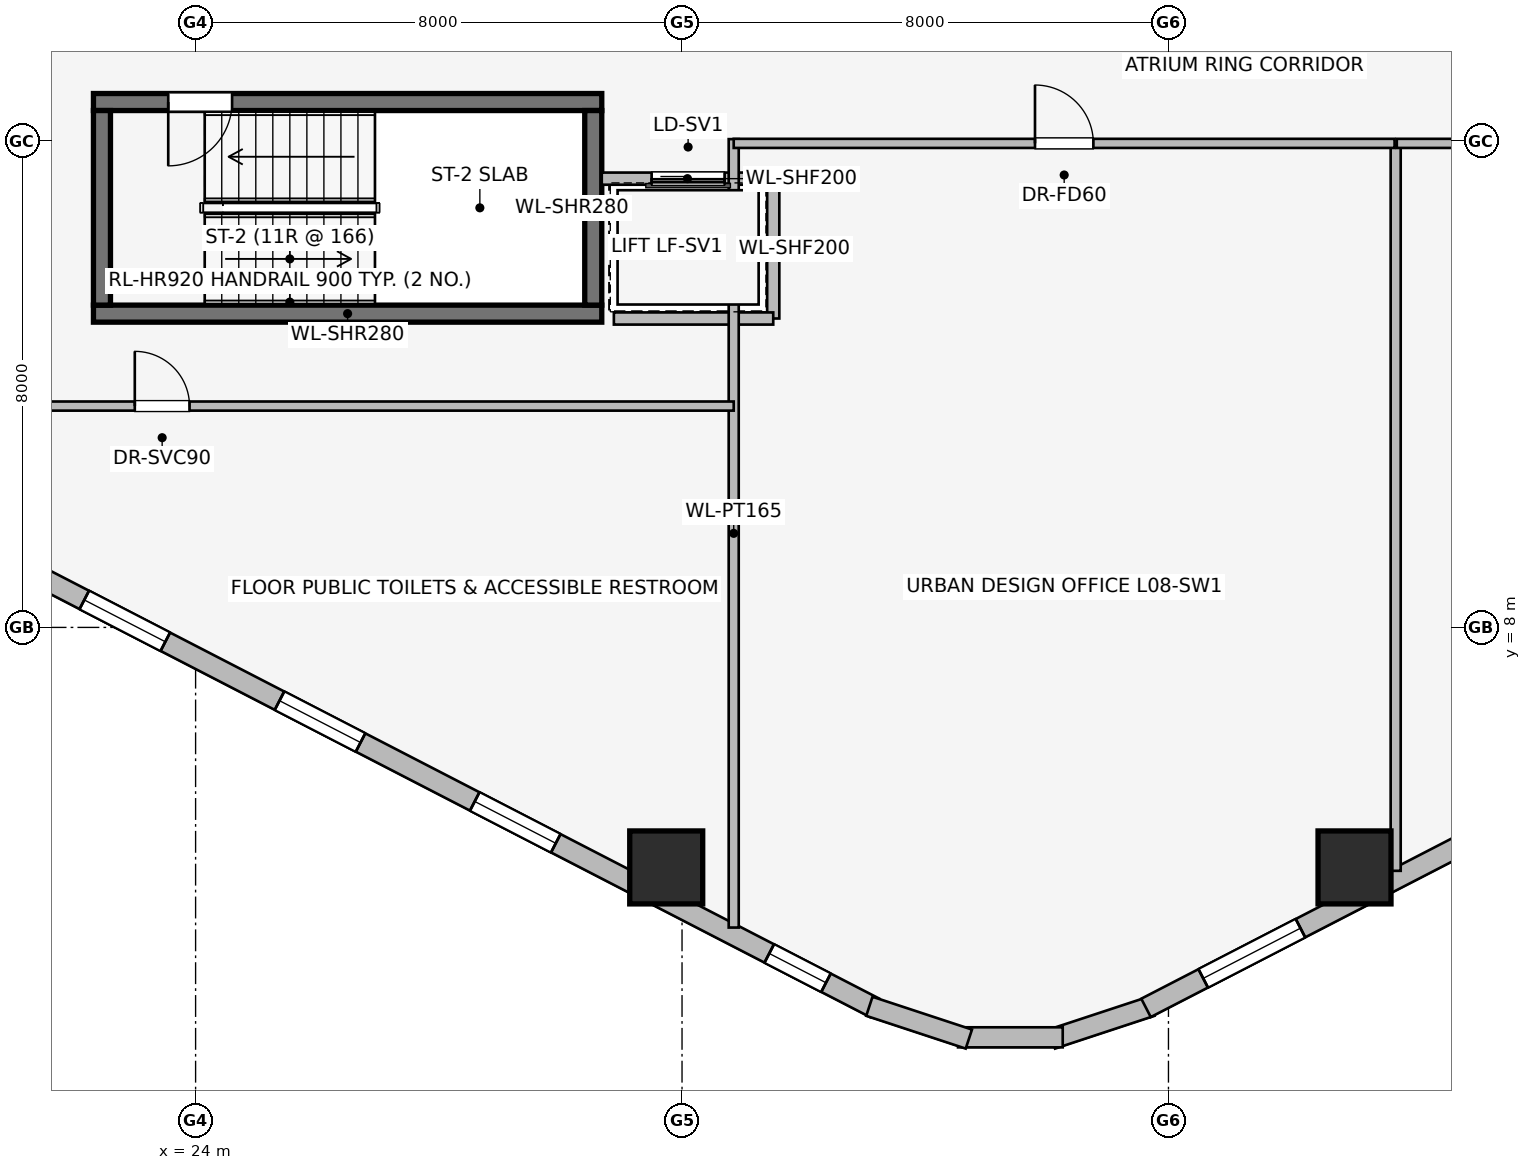
"""IFC4 building model, lengths in metres.
Left out: names, types, materials, properties, quantities, classifications, styles, units other than length and angle.
Written with IfcOpenShell. Run it as: python <this file> out.ifc"""

import sys

from ifc_helpers import new_model, si_unit, direction, frame, frame_2d, origin, origin_2d, place, context, subcontext, project, spatial, rectangle, extrude, element, fill, save


model = new_model("IFC4")
c1 = context("Model", 3, precision=1e-05, world=origin(), true_north=direction((0.0, 1.0)))
c2 = subcontext(c1, "Body", "Model", "MODEL_VIEW")
j1 = project(units=[si_unit("LENGTHUNIT", "METRE"), si_unit("PLANEANGLEUNIT", "RADIAN")], contexts=[c1])
p1 = place(None, origin())
s1 = spatial("IfcSite", under=j1, at=p1, CompositionType="ELEMENT")
p2 = place(p1, origin())
s2 = spatial("IfcBuilding", under=s1, at=p2, CompositionType="ELEMENT")
p3 = place(p2, frame((0.0, 0.0, 34.3)))
s3 = spatial("IfcBuildingStorey", under=s2, at=p3, CompositionType="ELEMENT", Elevation=34.3)
p4 = place(p3, frame((22.32, 13.16, 0.0), z_axis=(0.0, 0.0, 1.0), x_axis=(1.0, 0.0, 0.0)))
e1 = element("IfcWall", 1, at=p4, inside=s3, PredefinedType="SHEAR", context=c2, shape_type="SweptSolid", body=[
    extrude(rectangle(XDim=8.36, YDim=0.28, at=frame_2d((4.18, 0.0))), origin(), (0.0, 0.0, 1.0), 3.65),
])
p5 = place(p3, frame((30.68, 16.64, 0.0), z_axis=(0.0, 0.0, 1.0), x_axis=(-1.0, 0.0, 0.0)))
e2 = element("IfcWall", 2, at=p5, inside=s3, PredefinedType="SHEAR", context=c2, shape_type="SweptSolid", body=[
    extrude(rectangle(XDim=8.36, YDim=0.28, at=frame_2d((4.18, 0.0))), origin(), (0.0, 0.0, 1.0), 3.65),
])
p6 = place(p5, frame((6.08, 0.0, 0.0)))
e3 = element("IfcOpeningElement", 3, at=p6, cuts=e2, PredefinedType="OPENING", context=c2, shape_type="SweptSolid", body=[
    extrude(rectangle(XDim=1.05, YDim=2.0, at=frame_2d((0.525, 1.0))), frame((0.0, 0.15, 0.0), z_axis=(0.0, -1.0, 0.0), x_axis=(1.0, 0.0, 0.0)), (0.0, 0.0, 1.0), 0.3),
])
for number, where, z_axis, x_axis in (
    (4, (22.46, 16.5, 0.0), (0.0, 0.0, 1.0), (0.0, -1.0, 0.0)),
    (5, (30.54, 13.3, 0.0), (0.0, 0.0, 1.0), (0.0, 1.0, 0.0)),
):
    element("IfcWall", number, at=place(p3, frame(where, z_axis=z_axis, x_axis=x_axis)), inside=s3, PredefinedType="SHEAR", context=c2, shape_type="SweptSolid", body=[
        extrude(rectangle(XDim=3.2, YDim=0.28, at=frame_2d((1.6, 0.0))), origin(), (0.0, 0.0, 1.0), 3.65),
    ])
for number, where, z_axis, x_axis in (
    (6, (31.74, 4.053, 0.0), (0.0, 0.0, 1.0), (1.0, 0.0, 0.0)),
    (7, (43.06, 4.053, 0.0), (0.0, 0.0, 1.0), (1.0, 0.0, 0.0)),
):
    element("IfcColumn", number, at=place(p3, frame(where, z_axis=z_axis, x_axis=x_axis)), inside=s3, PredefinedType="COLUMN", context=c2, shape_type="SweptSolid", body=[
        extrude(rectangle(XDim=1.2, YDim=1.2, at=origin_2d()), origin(), (0.0, 0.0, 1.0), 3.65),
    ])
p7 = place(p3, frame((35.169, 1.743, 0.0), z_axis=(0.0, 0.0, 1.0), x_axis=(-0.888634413993, 0.458616264721, 0.0)))
e8 = element("IfcWall", 8, at=p7, inside=s3, PredefinedType="STANDARD", context=c2, shape_type="SweptSolid", body=[
    extrude(rectangle(XDim=20.531, YDim=0.34, at=frame_2d((10.266, 0.0))), origin(), (0.0, 0.0, 1.0), 2.684),
])
p8 = place(p7, frame((0.902, 0.0, 0.75)))
e9 = element("IfcOpeningElement", 9, at=p8, cuts=e8, PredefinedType="OPENING", context=c2, shape_type="SweptSolid", body=[
    extrude(rectangle(XDim=1.05, YDim=1.4, at=frame_2d((0.525, 0.7))), frame((0.0, 0.18, 0.0), z_axis=(0.0, -1.0, 0.0), x_axis=(1.0, 0.0, 0.0)), (0.0, 0.0, 1.0), 0.36),
])
p9 = place(p7, frame((5.903, 0.0, 0.75)))
e10 = element("IfcOpeningElement", 10, at=p9, cuts=e8, PredefinedType="OPENING", context=c2, shape_type="SweptSolid", body=[
    extrude(rectangle(XDim=1.5, YDim=1.5, at=frame_2d((0.75, 0.75))), frame((0.0, 0.18, 0.0), z_axis=(0.0, -1.0, 0.0), x_axis=(1.0, 0.0, 0.0)), (0.0, 0.0, 1.0), 0.36),
])
p10 = place(p7, frame((9.516, 0.0, 0.75)))
e11 = element("IfcOpeningElement", 11, at=p10, cuts=e8, PredefinedType="OPENING", context=c2, shape_type="SweptSolid", body=[
    extrude(rectangle(XDim=1.5, YDim=1.5, at=frame_2d((0.75, 0.75))), frame((0.0, 0.18, 0.0), z_axis=(0.0, -1.0, 0.0), x_axis=(1.0, 0.0, 0.0)), (0.0, 0.0, 1.0), 0.36),
])
p11 = place(p7, frame((13.129, 0.0, 0.75)))
e12 = element("IfcOpeningElement", 12, at=p11, cuts=e8, PredefinedType="OPENING", context=c2, shape_type="SweptSolid", body=[
    extrude(rectangle(XDim=1.5, YDim=1.5, at=frame_2d((0.75, 0.75))), frame((0.0, 0.18, 0.0), z_axis=(0.0, -1.0, 0.0), x_axis=(1.0, 0.0, 0.0)), (0.0, 0.0, 1.0), 0.36),
])
p12 = place(p7, frame((17.673, 0.0, 0.75)))
e13 = element("IfcOpeningElement", 13, at=p12, cuts=e8, PredefinedType="OPENING", context=c2, shape_type="SweptSolid", body=[
    extrude(rectangle(XDim=1.8, YDim=1.5, at=frame_2d((0.9, 0.75))), frame((0.0, 0.18, 0.0), z_axis=(0.0, -1.0, 0.0), x_axis=(1.0, 0.0, 0.0)), (0.0, 0.0, 1.0), 0.36),
])
p13 = place(p3, frame((39.719, 1.769, 0.0), z_axis=(0.0, 0.0, 1.0), x_axis=(-0.94976901097, -0.312951794691, 0.0)))
e14 = element("IfcWall", 14, at=p13, inside=s3, PredefinedType="STANDARD", context=c2, shape_type="SweptSolid", body=[
    extrude(rectangle(XDim=1.722, YDim=0.33, at=frame_2d((0.861, 0.0))), origin(), (0.0, 0.0, 1.0), 3.39),
])
p14 = place(p3, frame((38.261, 1.259, 0.0), z_axis=(0.0, 0.0, 1.0), x_axis=(-1.0, 0.0, 0.0)))
e15 = element("IfcWall", 15, at=p14, inside=s3, PredefinedType="STANDARD", context=c2, shape_type="SweptSolid", body=[
    extrude(rectangle(XDim=1.722, YDim=0.33, at=frame_2d((0.861, 0.0))), origin(), (0.0, 0.0, 1.0), 3.39),
])
p15 = place(p3, frame((36.717, 1.23, 0.0), z_axis=(0.0, 0.0, 1.0), x_axis=(-0.94976901097, 0.312951794691, 0.0)))
e16 = element("IfcWall", 16, at=p15, inside=s3, PredefinedType="STANDARD", context=c2, shape_type="SweptSolid", body=[
    extrude(rectangle(XDim=1.722, YDim=0.33, at=frame_2d((0.861, 0.0))), origin(), (0.0, 0.0, 1.0), 3.39),
])
p16 = place(p3, frame((57.876, 11.159, 0.0), z_axis=(0.0, 0.0, 1.0), x_axis=(-0.888634413993, -0.458616264721, 0.0)))
e17 = element("IfcWall", 17, at=p16, inside=s3, PredefinedType="STANDARD", context=c2, shape_type="SweptSolid", body=[
    extrude(rectangle(XDim=20.531, YDim=0.34, at=frame_2d((10.266, 0.0))), origin(), (0.0, 0.0, 1.0), 2.684),
])
p17 = place(p16, frame((1.058, 0.0, 0.75)))
e18 = element("IfcOpeningElement", 18, at=p17, cuts=e17, PredefinedType="OPENING", context=c2, shape_type="SweptSolid", body=[
    extrude(rectangle(XDim=1.8, YDim=1.5, at=frame_2d((0.9, 0.75))), frame((0.0, 0.18, 0.0), z_axis=(0.0, -1.0, 0.0), x_axis=(1.0, 0.0, 0.0)), (0.0, 0.0, 1.0), 0.36),
])
p18 = place(p16, frame((5.87, 0.0, 0.75)))
e19 = element("IfcOpeningElement", 19, at=p18, cuts=e17, PredefinedType="OPENING", context=c2, shape_type="SweptSolid", body=[
    extrude(rectangle(XDim=1.5, YDim=1.5, at=frame_2d((0.75, 0.75))), frame((0.0, 0.18, 0.0), z_axis=(0.0, -1.0, 0.0), x_axis=(1.0, 0.0, 0.0)), (0.0, 0.0, 1.0), 0.36),
])
p19 = place(p16, frame((9.416, 0.0, 0.75)))
e20 = element("IfcOpeningElement", 20, at=p19, cuts=e17, PredefinedType="OPENING", context=c2, shape_type="SweptSolid", body=[
    extrude(rectangle(XDim=1.5, YDim=1.5, at=frame_2d((0.75, 0.75))), frame((0.0, 0.18, 0.0), z_axis=(0.0, -1.0, 0.0), x_axis=(1.0, 0.0, 0.0)), (0.0, 0.0, 1.0), 0.36),
])
p20 = place(p16, frame((12.963, 0.0, 0.75)))
e21 = element("IfcOpeningElement", 21, at=p20, cuts=e17, PredefinedType="OPENING", context=c2, shape_type="SweptSolid", body=[
    extrude(rectangle(XDim=1.5, YDim=1.5, at=frame_2d((0.75, 0.75))), frame((0.0, 0.18, 0.0), z_axis=(0.0, -1.0, 0.0), x_axis=(1.0, 0.0, 0.0)), (0.0, 0.0, 1.0), 0.36),
])
p21 = place(p16, frame((17.673, 0.0, 0.75)))
e22 = element("IfcOpeningElement", 22, at=p21, cuts=e17, PredefinedType="OPENING", context=c2, shape_type="SweptSolid", body=[
    extrude(rectangle(XDim=1.8, YDim=1.5, at=frame_2d((0.9, 0.75))), frame((0.0, 0.18, 0.0), z_axis=(0.0, -1.0, 0.0), x_axis=(1.0, 0.0, 0.0)), (0.0, 0.0, 1.0), 0.36),
])
p22 = place(p3, frame((33.5, 15.38, 0.0), z_axis=(0.0, 0.0, 1.0), x_axis=(-1.0, 0.0, 0.0)))
e23 = element("IfcWall", 23, at=p22, inside=s3, PredefinedType="PARTITIONING", context=c2, shape_type="SweptSolid", body=[
    extrude(rectangle(XDim=2.82, YDim=0.2, at=frame_2d((1.41, 0.0))), origin(), (0.0, 0.0, 1.0), 3.39),
])
p23 = place(p22, frame((0.8, 0.0, 0.0)))
e24 = element("IfcOpeningElement", 24, at=p23, cuts=e23, PredefinedType="OPENING", context=c2, shape_type="SweptSolid", body=[
    extrude(rectangle(XDim=1.2, YDim=2.2, at=frame_2d((0.6, 1.1))), frame((0.0, 0.11, 0.0), z_axis=(0.0, -1.0, 0.0), x_axis=(1.0, 0.0, 0.0)), (0.0, 0.0, 1.0), 0.22),
])
p24 = place(p3, frame((33.5, 13.08, 0.0), z_axis=(0.0, 0.0, 1.0), x_axis=(0.0, 1.0, 0.0)))
e25 = element("IfcWall", 25, at=p24, inside=s3, PredefinedType="PARTITIONING", context=c2, shape_type="SweptSolid", body=[
    extrude(rectangle(XDim=2.3, YDim=0.2, at=frame_2d((1.15, 0.0))), origin(), (0.0, 0.0, 1.0), 3.39),
])
p25 = place(p3, frame((30.879, 13.08, 0.0), z_axis=(0.0, 0.0, 1.0), x_axis=(1.0, 0.0, 0.0)))
e26 = element("IfcWall", 26, at=p25, inside=s3, PredefinedType="PARTITIONING", context=c2, shape_type="SweptSolid", body=[
    extrude(rectangle(XDim=2.621, YDim=0.2, at=frame_2d((1.311, 0.0))), origin(), (0.0, 0.0, 1.0), 3.39),
])
p26 = place(p3, frame((32.85, 3.064, 0.0), z_axis=(0.0, 0.0, 1.0), x_axis=(0.0, 1.0, 0.0)))
e27 = element("IfcWall", 27, at=p26, inside=s3, PredefinedType="PARTITIONING", context=c2, shape_type="SweptSolid", body=[
    extrude(rectangle(XDim=12.966, YDim=0.165, at=frame_2d((6.483, 0.0))), origin(), (0.0, 0.0, 1.0), 3.39),
])
p27 = place(p3, frame((16.487, 11.64, 0.0), z_axis=(0.0, 0.0, 1.0), x_axis=(1.0, 0.0, 0.0)))
e28 = element("IfcWall", 28, at=p27, inside=s3, PredefinedType="PARTITIONING", context=c2, shape_type="SweptSolid", body=[
    extrude(rectangle(XDim=16.363, YDim=0.15, at=frame_2d((8.182, 0.0))), origin(), (0.0, 0.0, 1.0), 3.39),
])
p28 = place(p27, frame((6.513, 0.0, 0.0)))
e29 = element("IfcOpeningElement", 29, at=p28, cuts=e28, PredefinedType="OPENING", context=c2, shape_type="SweptSolid", body=[
    extrude(rectangle(XDim=0.9, YDim=2.0, at=frame_2d((0.45, 1.0))), frame((0.0, 0.085, 0.0), z_axis=(0.0, -1.0, 0.0), x_axis=(1.0, 0.0, 0.0)), (0.0, 0.0, 1.0), 0.17),
])
p29 = place(p3, frame((43.737, 3.997, 0.0), z_axis=(0.0, 0.0, 1.0), x_axis=(0.0, 1.0, 0.0)))
e30 = element("IfcWall", 30, at=p29, inside=s3, PredefinedType="PARTITIONING", context=c2, shape_type="SweptSolid", body=[
    extrude(rectangle(XDim=11.933, YDim=0.165, at=frame_2d((5.966, 0.0))), origin(), (0.0, 0.0, 1.0), 3.39),
])
p30 = place(p3, frame((32.85, 15.96, 0.0), z_axis=(0.0, 0.0, 1.0), x_axis=(1.0, 0.0, 0.0)))
e31 = element("IfcWall", 31, at=p30, inside=s3, PredefinedType="PARTITIONING", context=c2, shape_type="SweptSolid", body=[
    extrude(rectangle(XDim=10.869, YDim=0.15, at=frame_2d((5.435, 0.0))), origin(), (0.0, 0.0, 1.0), 3.39),
])
p31 = place(p30, frame((4.955, 0.0, 0.0)))
e32 = element("IfcOpeningElement", 32, at=p31, cuts=e31, PredefinedType="OPENING", context=c2, shape_type="SweptSolid", body=[
    extrude(rectangle(XDim=0.96, YDim=2.0, at=frame_2d((0.48, 1.0))), frame((0.0, 0.085, 0.0), z_axis=(0.0, -1.0, 0.0), x_axis=(1.0, 0.0, 0.0)), (0.0, 0.0, 1.0), 0.17),
])
p32 = place(p3, frame((43.755, 15.96, 0.0), z_axis=(0.0, 0.0, 1.0), x_axis=(1.0, 0.0, 0.0)))
e33 = element("IfcWall", 33, at=p32, inside=s3, PredefinedType="PARTITIONING", context=c2, shape_type="SweptSolid", body=[
    extrude(rectangle(XDim=16.498, YDim=0.15, at=frame_2d((8.249, 0.0))), origin(), (0.0, 0.0, 1.0), 3.39),
])
p33 = place(p32, frame((7.783, 0.0, 0.0)))
e34 = element("IfcOpeningElement", 34, at=p33, cuts=e33, PredefinedType="OPENING", context=c2, shape_type="SweptSolid", body=[
    extrude(rectangle(XDim=0.96, YDim=2.0, at=frame_2d((0.48, 1.0))), frame((0.0, 0.085, 0.0), z_axis=(0.0, -1.0, 0.0), x_axis=(1.0, 0.0, 0.0)), (0.0, 0.0, 1.0), 0.17),
])
p34 = place(p8, origin())
e35 = element("IfcWindow", 35, at=p34, inside=s3, PartitioningType="SINGLE_PANEL", PredefinedType="WINDOW", context=c2, shape_type="SweptSolid", body=[
    extrude(rectangle(XDim=1.05, YDim=1.4, at=frame_2d((0.525, 0.7))), frame((0.0, 0.03, 0.0), z_axis=(0.0, -1.0, 0.0), x_axis=(1.0, 0.0, 0.0)), (0.0, 0.0, 1.0), 0.06),
])
fill(e9, e35)
p35 = place(p9, origin())
e36 = element("IfcWindow", 36, at=p35, inside=s3, PartitioningType="SINGLE_PANEL", PredefinedType="WINDOW", context=c2, shape_type="SweptSolid", body=[
    extrude(rectangle(XDim=1.5, YDim=1.5, at=frame_2d((0.75, 0.75))), frame((0.0, 0.03, 0.0), z_axis=(0.0, -1.0, 0.0), x_axis=(1.0, 0.0, 0.0)), (0.0, 0.0, 1.0), 0.06),
])
fill(e10, e36)
p36 = place(p10, origin())
e37 = element("IfcWindow", 37, at=p36, inside=s3, PartitioningType="SINGLE_PANEL", PredefinedType="WINDOW", context=c2, shape_type="SweptSolid", body=[
    extrude(rectangle(XDim=1.5, YDim=1.5, at=frame_2d((0.75, 0.75))), frame((0.0, 0.03, 0.0), z_axis=(0.0, -1.0, 0.0), x_axis=(1.0, 0.0, 0.0)), (0.0, 0.0, 1.0), 0.06),
])
fill(e11, e37)
p37 = place(p11, origin())
e38 = element("IfcWindow", 38, at=p37, inside=s3, PartitioningType="SINGLE_PANEL", PredefinedType="WINDOW", context=c2, shape_type="SweptSolid", body=[
    extrude(rectangle(XDim=1.5, YDim=1.5, at=frame_2d((0.75, 0.75))), frame((0.0, 0.03, 0.0), z_axis=(0.0, -1.0, 0.0), x_axis=(1.0, 0.0, 0.0)), (0.0, 0.0, 1.0), 0.06),
])
fill(e12, e38)
p38 = place(p21, origin())
e39 = element("IfcWindow", 39, at=p38, inside=s3, PartitioningType="SINGLE_PANEL", PredefinedType="WINDOW", context=c2, shape_type="SweptSolid", body=[
    extrude(rectangle(XDim=1.8, YDim=1.5, at=frame_2d((0.9, 0.75))), frame((0.0, 0.03, 0.0), z_axis=(0.0, -1.0, 0.0), x_axis=(1.0, 0.0, 0.0)), (0.0, 0.0, 1.0), 0.06),
])
fill(e22, e39)
p39 = place(p6, origin())
e40 = element("IfcDoor", 40, at=p39, inside=s3, OperationType="SINGLE_SWING_RIGHT", PredefinedType="DOOR", context=c2, shape_type="SweptSolid", body=[
    extrude(rectangle(XDim=1.05, YDim=2.0, at=frame_2d((0.525, 1.0))), frame((0.0, 0.025, 0.0), z_axis=(0.0, -1.0, 0.0), x_axis=(1.0, 0.0, 0.0)), (0.0, 0.0, 1.0), 0.05),
])
fill(e3, e40)
p40 = place(p23, origin())
e41 = element("IfcDoor", 41, at=p40, inside=s3, OperationType="SLIDING_TO_RIGHT", PredefinedType="DOOR", context=c2, shape_type="SweptSolid", body=[
    extrude(rectangle(XDim=1.2, YDim=2.2, at=frame_2d((0.6, 1.1))), frame((0.0, 0.025, 0.0), z_axis=(0.0, -1.0, 0.0), x_axis=(1.0, 0.0, 0.0)), (0.0, 0.0, 1.0), 0.05),
])
fill(e24, e41)
p41 = place(p28, origin())
e42 = element("IfcDoor", 42, at=p41, inside=s3, OperationType="SINGLE_SWING_LEFT", PredefinedType="DOOR", context=c2, shape_type="SweptSolid", body=[
    extrude(rectangle(XDim=0.9, YDim=2.0, at=frame_2d((0.45, 1.0))), frame((0.0, 0.025, 0.0), z_axis=(0.0, -1.0, 0.0), x_axis=(1.0, 0.0, 0.0)), (0.0, 0.0, 1.0), 0.05),
])
fill(e29, e42)
p42 = place(p31, origin())
e43 = element("IfcDoor", 43, at=p42, inside=s3, OperationType="SINGLE_SWING_LEFT", PredefinedType="DOOR", context=c2, shape_type="SweptSolid", body=[
    extrude(rectangle(XDim=0.96, YDim=2.0, at=frame_2d((0.48, 1.0))), frame((0.0, 0.025, 0.0), z_axis=(0.0, -1.0, 0.0), x_axis=(1.0, 0.0, 0.0)), (0.0, 0.0, 1.0), 0.05),
])
fill(e32, e43)
save(model, sys.argv[1])
